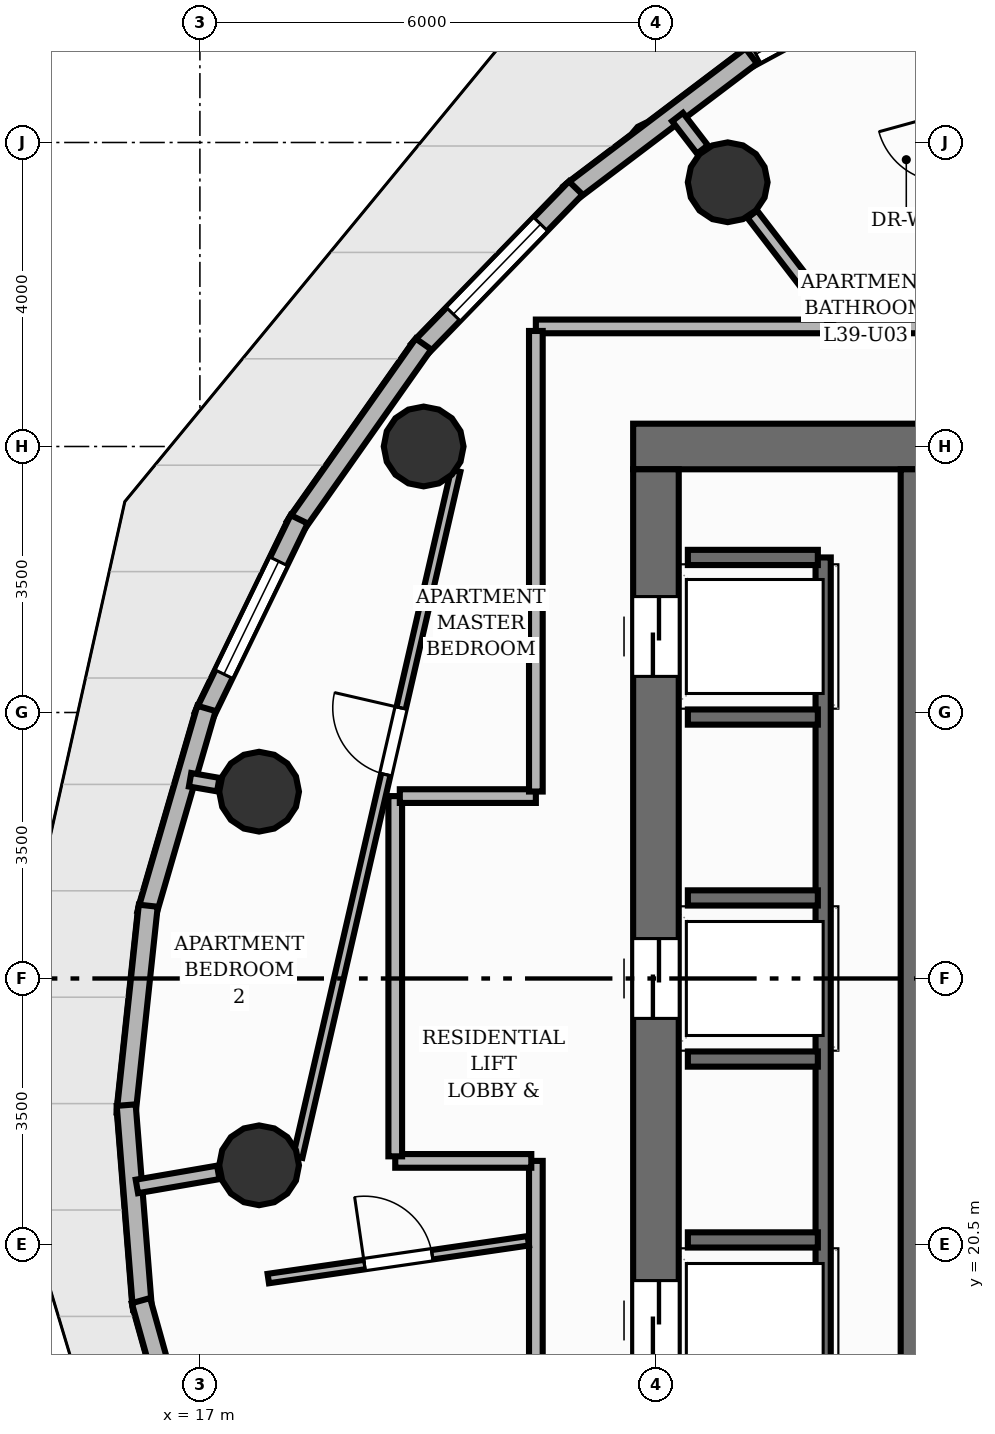
"""IFC4 building model, lengths in metres.
Left out: names, types, materials, properties, quantities, classifications, styles, units other than length and angle.
Written with IfcOpenShell. Run it as: python <this file> out.ifc"""

import sys

from ifc_helpers import new_model, si_unit, direction, frame, frame_2d, origin, origin_2d, place, context, subcontext, project, spatial, rectangle, circle, extrude, element, fill, save


model = new_model("IFC4")
c1 = context("Model", 3, precision=1e-05, world=origin(), true_north=direction((0.0, 1.0)))
c2 = subcontext(c1, "Body", "Model", "MODEL_VIEW")
j1 = project(units=[si_unit("LENGTHUNIT", "METRE"), si_unit("PLANEANGLEUNIT", "RADIAN")], contexts=[c1])
p1 = place(None, origin())
s1 = spatial("IfcSite", under=j1, at=p1, CompositionType="ELEMENT")
p2 = place(p1, origin())
s2 = spatial("IfcBuilding", under=s1, at=p2, CompositionType="ELEMENT")
p3 = place(p2, frame((0.0, 0.0, 132.96)))
s3 = spatial("IfcBuildingStorey", under=s2, at=p3, CompositionType="ELEMENT", Elevation=132.96)
p4 = place(p3, frame((22.7, 31.0, 0.0), z_axis=(0.0, 0.0, 1.0), x_axis=(1.0, 0.0, 0.0)))
e1 = element("IfcWall", 1, at=p4, inside=s3, PredefinedType="SHEAR", context=c2, shape_type="SweptSolid", body=[
    extrude(rectangle(XDim=15.1, YDim=0.6, at=frame_2d((7.55, 0.0))), origin(), (0.0, 0.0, 1.0), 3.2),
])
p5 = place(p4, frame((11.7, 0.0, 0.0)))
e2 = element("IfcOpeningElement", 2, at=p5, cuts=e1, PredefinedType="OPENING", context=c2, shape_type="SweptSolid", body=[
    extrude(rectangle(XDim=1.1, YDim=2.15, at=frame_2d((0.55, 1.075))), frame((0.0, 0.31, 0.0), z_axis=(0.0, -1.0, 0.0), x_axis=(1.0, 0.0, 0.0)), (0.0, 0.0, 1.0), 0.62),
])
p6 = place(p3, frame((23.0, 17.3, 0.0), z_axis=(0.0, 0.0, 1.0), x_axis=(0.0, 1.0, 0.0)))
e3 = element("IfcWall", 3, at=p6, inside=s3, PredefinedType="SHEAR", context=c2, shape_type="SweptSolid", body=[
    extrude(rectangle(XDim=13.4, YDim=0.6, at=frame_2d((6.7, 0.0))), origin(), (0.0, 0.0, 1.0), 3.2),
])
p7 = place(p6, frame((1.675, 0.0, 0.0)))
e4 = element("IfcOpeningElement", 4, at=p7, cuts=e3, PredefinedType="OPENING", context=c2, shape_type="SweptSolid", body=[
    extrude(rectangle(XDim=1.05, YDim=2.15, at=frame_2d((0.525, 1.075))), frame((0.0, 0.31, 0.0), z_axis=(0.0, -1.0, 0.0), x_axis=(1.0, 0.0, 0.0)), (0.0, 0.0, 1.0), 0.62),
])
p8 = place(p6, frame((6.175, 0.0, 0.0)))
e5 = element("IfcOpeningElement", 5, at=p8, cuts=e3, PredefinedType="OPENING", context=c2, shape_type="SweptSolid", body=[
    extrude(rectangle(XDim=1.05, YDim=2.15, at=frame_2d((0.525, 1.075))), frame((0.0, 0.31, 0.0), z_axis=(0.0, -1.0, 0.0), x_axis=(1.0, 0.0, 0.0)), (0.0, 0.0, 1.0), 0.62),
])
p9 = place(p6, frame((10.675, 0.0, 0.0)))
e6 = element("IfcOpeningElement", 6, at=p9, cuts=e3, PredefinedType="OPENING", context=c2, shape_type="SweptSolid", body=[
    extrude(rectangle(XDim=1.05, YDim=2.15, at=frame_2d((0.525, 1.075))), frame((0.0, 0.31, 0.0), z_axis=(0.0, -1.0, 0.0), x_axis=(1.0, 0.0, 0.0)), (0.0, 0.0, 1.0), 0.62),
])
p10 = place(p3, frame((26.5, 17.3, 0.0), z_axis=(0.0, 0.0, 1.0), x_axis=(0.0, 1.0, 0.0)))
e7 = element("IfcWall", 7, at=p10, inside=s3, PredefinedType="SHEAR", context=c2, shape_type="SweptSolid", body=[
    extrude(rectangle(XDim=13.4, YDim=0.56, at=frame_2d((6.7, 0.0))), origin(), (0.0, 0.0, 1.0), 3.2),
])
for number, where, z_axis, x_axis in (
    (8, (23.944, 34.477, 0.0), (0.0, 0.0, 1.0), (1.0, 0.0, 0.0)),
    (9, (19.944, 31.0, 0.0), (0.0, 0.0, 1.0), (1.0, 0.0, 0.0)),
    (10, (17.779, 26.458, 0.0), (0.0, 0.0, 1.0), (1.0, 0.0, 0.0)),
    (11, (17.779, 21.542, 0.0), (0.0, 0.0, 1.0), (1.0, 0.0, 0.0)),
):
    element("IfcColumn", number, at=place(p3, frame(where, z_axis=z_axis, x_axis=x_axis)), inside=s3, PredefinedType="COLUMN", context=c2, shape_type="SweptSolid", body=[
        extrude(circle(Radius=0.525, at=origin_2d()), origin(), (0.0, 0.0, 1.0), 3.2),
    ])
p11 = place(p3, frame((24.163, 36.079, 0.0), z_axis=(0.0, 0.0, 1.0), x_axis=(0.879567466611, 0.475774181393, 0.0)))
e12 = element("IfcWall", 12, at=p11, inside=s3, PredefinedType="SOLIDWALL", context=c2, shape_type="SweptSolid", body=[
    extrude(rectangle(XDim=2.998, YDim=0.25, at=frame_2d((1.499, 0.0))), origin(), (0.0, 0.0, 1.0), 2.96),
])
p12 = place(p11, frame((0.175, 0.0, 0.85)))
e13 = element("IfcOpeningElement", 13, at=p12, cuts=e12, PredefinedType="OPENING", context=c2, shape_type="SweptSolid", body=[
    extrude(rectangle(XDim=1.65, YDim=1.55, at=frame_2d((0.825, 0.775))), frame((0.0, 0.135, 0.0), z_axis=(0.0, -1.0, 0.0), x_axis=(1.0, 0.0, 0.0)), (0.0, 0.0, 1.0), 0.27),
])
p13 = place(p3, frame((21.863, 34.329, 0.0), z_axis=(0.0, 0.0, 1.0), x_axis=(0.797511213298, 0.603304122863, 0.0)))
e14 = element("IfcWall", 14, at=p13, inside=s3, PredefinedType="SOLIDWALL", context=c2, shape_type="SweptSolid", body=[
    extrude(rectangle(XDim=2.998, YDim=0.25, at=frame_2d((1.499, 0.0))), origin(), (0.0, 0.0, 1.0), 2.96),
])
p14 = place(p3, frame((19.872, 32.264, 0.0), z_axis=(0.0, 0.0, 1.0), x_axis=(0.696240605886, 0.717808483312, 0.0)))
e15 = element("IfcWall", 15, at=p14, inside=s3, PredefinedType="SOLIDWALL", context=c2, shape_type="SweptSolid", body=[
    extrude(rectangle(XDim=2.977, YDim=0.25, at=frame_2d((1.489, 0.0))), origin(), (0.0, 0.0, 1.0), 2.96),
])
p15 = place(p14, frame((0.664, 0.0, 0.85)))
e16 = element("IfcOpeningElement", 16, at=p15, cuts=e15, PredefinedType="OPENING", context=c2, shape_type="SweptSolid", body=[
    extrude(rectangle(XDim=1.65, YDim=1.55, at=frame_2d((0.825, 0.775))), frame((0.0, 0.135, 0.0), z_axis=(0.0, -1.0, 0.0), x_axis=(1.0, 0.0, 0.0)), (0.0, 0.0, 1.0), 0.27),
])
p16 = place(p3, frame((18.25, 29.948, 0.0), z_axis=(0.0, 0.0, 1.0), x_axis=(0.576020449187, 0.817435283137, 0.0)))
e17 = element("IfcWall", 17, at=p16, inside=s3, PredefinedType="SOLIDWALL", context=c2, shape_type="SweptSolid", body=[
    extrude(rectangle(XDim=2.937, YDim=0.25, at=frame_2d((1.468, 0.0))), origin(), (0.0, 0.0, 1.0), 2.96),
])
p17 = place(p3, frame((17.047, 27.45, 0.0), z_axis=(0.0, 0.0, 1.0), x_axis=(0.436882419805, 0.899518621967, 0.0)))
e18 = element("IfcWall", 18, at=p17, inside=s3, PredefinedType="SOLIDWALL", context=c2, shape_type="SweptSolid", body=[
    extrude(rectangle(XDim=2.882, YDim=0.25, at=frame_2d((1.441, 0.0))), origin(), (0.0, 0.0, 1.0), 2.96),
])
p18 = place(p17, frame((0.616, 0.0, 0.85)))
e19 = element("IfcOpeningElement", 19, at=p18, cuts=e18, PredefinedType="OPENING", context=c2, shape_type="SweptSolid", body=[
    extrude(rectangle(XDim=1.65, YDim=1.55, at=frame_2d((0.825, 0.775))), frame((0.0, 0.135, 0.0), z_axis=(0.0, -1.0, 0.0), x_axis=(1.0, 0.0, 0.0)), (0.0, 0.0, 1.0), 0.27),
])
p19 = place(p3, frame((16.299, 24.848, 0.0), z_axis=(0.0, 0.0, 1.0), x_axis=(0.27958078407, 0.960122172007, 0.0)))
e20 = element("IfcWall", 20, at=p19, inside=s3, PredefinedType="SOLIDWALL", context=c2, shape_type="SweptSolid", body=[
    extrude(rectangle(XDim=2.818, YDim=0.25, at=frame_2d((1.409, 0.0))), origin(), (0.0, 0.0, 1.0), 2.96),
])
p20 = place(p3, frame((16.029, 22.221, 0.0), z_axis=(0.0, 0.0, 1.0), x_axis=(0.106010014212, 0.994365062181, 0.0)))
e21 = element("IfcWall", 21, at=p20, inside=s3, PredefinedType="SOLIDWALL", context=c2, shape_type="SweptSolid", body=[
    extrude(rectangle(XDim=2.752, YDim=0.25, at=frame_2d((1.376, 0.0))), origin(), (0.0, 0.0, 1.0), 2.96),
])
p21 = place(p3, frame((16.244, 19.65, 0.0), z_axis=(0.0, 0.0, 1.0), x_axis=(-0.079420906371, 0.996841170714, 0.0)))
e22 = element("IfcWall", 22, at=p21, inside=s3, PredefinedType="SOLIDWALL", context=c2, shape_type="SweptSolid", body=[
    extrude(rectangle(XDim=2.693, YDim=0.25, at=frame_2d((1.346, 0.0))), origin(), (0.0, 0.0, 1.0), 2.96),
])
p22 = place(p3, frame((16.938, 17.211, 0.0), z_axis=(0.0, 0.0, 1.0), x_axis=(-0.269469206067, 0.963009006698, 0.0)))
e23 = element("IfcWall", 23, at=p22, inside=s3, PredefinedType="SOLIDWALL", context=c2, shape_type="SweptSolid", body=[
    extrude(rectangle(XDim=2.648, YDim=0.25, at=frame_2d((1.324, 0.0))), origin(), (0.0, 0.0, 1.0), 2.96),
])
p23 = place(p3, frame((25.2, 18.46, 0.0), z_axis=(0.0, 0.0, 1.0), x_axis=(0.0, 1.0, 0.0)))
e24 = element("IfcWall", 24, at=p23, inside=s3, PredefinedType="SHEAR", context=c2, shape_type="SweptSolid", body=[
    extrude(rectangle(XDim=11.08, YDim=0.2, at=frame_2d((5.54, 0.0))), origin(), (0.0, 0.0, 1.0), 3.2),
])
for number, where, z_axis, x_axis in (
    (25, (23.42, 29.54, 0.0), (0.0, 0.0, 1.0), (1.0, 0.0, 0.0)),
    (26, (23.42, 20.56, 0.0), (0.0, 0.0, 1.0), (1.0, 0.0, 0.0)),
    (27, (23.42, 22.94, 0.0), (0.0, 0.0, 1.0), (1.0, 0.0, 0.0)),
    (28, (23.42, 25.06, 0.0), (0.0, 0.0, 1.0), (1.0, 0.0, 0.0)),
    (29, (23.42, 27.44, 0.0), (0.0, 0.0, 1.0), (1.0, 0.0, 0.0)),
):
    element("IfcWall", number, at=place(p3, frame(where, z_axis=z_axis, x_axis=x_axis)), inside=s3, PredefinedType="SHEAR", context=c2, shape_type="SweptSolid", body=[
        extrude(rectangle(XDim=1.71, YDim=0.2, at=frame_2d((0.855, 0.0))), origin(), (0.0, 0.0, 1.0), 3.2),
    ])
p24 = place(p3, frame((23.612, 34.908, 0.0), z_axis=(0.0, 0.0, 1.0), x_axis=(-0.609469486836, 0.792809526063, 0.0)))
e30 = element("IfcWall", 30, at=p24, inside=s3, PredefinedType="PARTITIONING", context=c2, shape_type="SweptSolid", body=[
    extrude(rectangle(XDim=0.538, YDim=0.18, at=frame_2d((0.269, 0.0))), origin(), (0.0, 0.0, 1.0), 2.336),
])
p25 = place(p3, frame((17.242, 26.551, 0.0), z_axis=(0.0, 0.0, 1.0), x_axis=(-0.98535888436, 0.170493017491, 0.0)))
e31 = element("IfcWall", 31, at=p25, inside=s3, PredefinedType="PARTITIONING", context=c2, shape_type="SweptSolid", body=[
    extrude(rectangle(XDim=0.377, YDim=0.18, at=frame_2d((0.188, 0.0))), origin(), (0.0, 0.0, 1.0), 2.336),
])
p26 = place(p3, frame((17.242, 21.449, 0.0), z_axis=(0.0, 0.0, 1.0), x_axis=(-0.985361391556, -0.170478526599, 0.0)))
e32 = element("IfcWall", 32, at=p26, inside=s3, PredefinedType="PARTITIONING", context=c2, shape_type="SweptSolid", body=[
    extrude(rectangle(XDim=1.087, YDim=0.18, at=frame_2d((0.543, 0.0))), origin(), (0.0, 0.0, 1.0), 2.336),
])
p27 = place(p3, frame((21.42, 32.58, 0.0), z_axis=(0.0, 0.0, 1.0), x_axis=(1.0, 0.0, 0.0)))
e33 = element("IfcWall", 33, at=p27, inside=s3, PredefinedType="PARTITIONING", context=c2, shape_type="SweptSolid", body=[
    extrude(rectangle(XDim=11.105, YDim=0.18, at=frame_2d((5.552, 0.0))), origin(), (0.0, 0.0, 1.0), 2.955),
])
p28 = place(p27, frame((8.093, 0.0, 0.0)))
e34 = element("IfcOpeningElement", 34, at=p28, cuts=e33, PredefinedType="OPENING", context=c2, shape_type="SweptSolid", body=[
    extrude(rectangle(XDim=1.05, YDim=2.15, at=frame_2d((0.525, 1.075))), frame((0.0, 0.1, 0.0), z_axis=(0.0, -1.0, 0.0), x_axis=(1.0, 0.0, 0.0)), (0.0, 0.0, 1.0), 0.2),
])
p29 = place(p3, frame((21.42, 15.48, 0.0), z_axis=(0.0, 0.0, 1.0), x_axis=(0.0, 1.0, 0.0)))
e35 = element("IfcWall", 35, at=p29, inside=s3, PredefinedType="PARTITIONING", context=c2, shape_type="SweptSolid", body=[
    extrude(rectangle(XDim=6.12, YDim=0.18, at=frame_2d((3.06, 0.0))), origin(), (0.0, 0.0, 1.0), 2.955),
])
p30 = place(p29, frame((2.167, 0.0, 0.0)))
e36 = element("IfcOpeningElement", 36, at=p30, cuts=e35, PredefinedType="OPENING", context=c2, shape_type="SweptSolid", body=[
    extrude(rectangle(XDim=1.05, YDim=2.15, at=frame_2d((0.525, 1.075))), frame((0.0, 0.1, 0.0), z_axis=(0.0, -1.0, 0.0), x_axis=(1.0, 0.0, 0.0)), (0.0, 0.0, 1.0), 0.2),
])
p31 = place(p3, frame((21.36, 21.6, 0.0), z_axis=(0.0, 0.0, 1.0), x_axis=(-1.0, 0.0, 0.0)))
e37 = element("IfcWall", 37, at=p31, inside=s3, PredefinedType="PARTITIONING", context=c2, shape_type="SweptSolid", body=[
    extrude(rectangle(XDim=1.79, YDim=0.18, at=frame_2d((0.895, 0.0))), origin(), (0.0, 0.0, 1.0), 2.336),
])
p32 = place(p3, frame((19.57, 21.66, 0.0), z_axis=(0.0, 0.0, 1.0), x_axis=(0.0, 1.0, 0.0)))
e38 = element("IfcWall", 38, at=p32, inside=s3, PredefinedType="PARTITIONING", context=c2, shape_type="SweptSolid", body=[
    extrude(rectangle(XDim=4.74, YDim=0.18, at=frame_2d((2.37, 0.0))), origin(), (0.0, 0.0, 1.0), 2.955),
])
p33 = place(p3, frame((19.63, 26.4, 0.0), z_axis=(0.0, 0.0, 1.0), x_axis=(1.0, 0.0, 0.0)))
e39 = element("IfcWall", 39, at=p33, inside=s3, PredefinedType="PARTITIONING", context=c2, shape_type="SweptSolid", body=[
    extrude(rectangle(XDim=1.79, YDim=0.18, at=frame_2d((0.895, 0.0))), origin(), (0.0, 0.0, 1.0), 2.955),
])
p34 = place(p3, frame((21.42, 26.46, 0.0), z_axis=(0.0, 0.0, 1.0), x_axis=(0.0, 1.0, 0.0)))
e40 = element("IfcWall", 40, at=p34, inside=s3, PredefinedType="PARTITIONING", context=c2, shape_type="SweptSolid", body=[
    extrude(rectangle(XDim=6.06, YDim=0.18, at=frame_2d((3.03, 0.0))), origin(), (0.0, 0.0, 1.0), 2.955),
])
p35 = place(p3, frame((27.545, 32.677, 0.0), z_axis=(0.0, 0.0, 1.0), x_axis=(-0.265393905211, 0.964140070258, 0.0)))
e41 = element("IfcWall", 41, at=p35, inside=s3, PredefinedType="PLUMBINGWALL", context=c2, shape_type="SweptSolid", body=[
    extrude(rectangle(XDim=4.708, YDim=0.16, at=frame_2d((2.354, 0.0))), origin(), (0.0, 0.0, 1.0), 2.955),
])
p36 = place(p35, frame((1.904, 0.0, 0.0)))
e42 = element("IfcOpeningElement", 42, at=p36, cuts=e41, PredefinedType="OPENING", context=c2, shape_type="SweptSolid", body=[
    extrude(rectangle(XDim=0.9, YDim=2.1, at=frame_2d((0.45, 1.05))), frame((0.0, 0.09, 0.0), z_axis=(0.0, -1.0, 0.0), x_axis=(1.0, 0.0, 0.0)), (0.0, 0.0, 1.0), 0.18),
])
p37 = place(p3, frame((25.342, 32.659, 0.0), z_axis=(0.0, 0.0, 1.0), x_axis=(-0.609536601946, 0.792757927042, 0.0)))
e43 = element("IfcWall", 43, at=p37, inside=s3, PredefinedType="PLUMBINGWALL", context=c2, shape_type="SweptSolid", body=[
    extrude(rectangle(XDim=1.761, YDim=0.16, at=frame_2d((0.881, 0.0))), origin(), (0.0, 0.0, 1.0), 2.336),
])
p38 = place(p3, frame((17.899, 20.052, 0.0), z_axis=(0.0, 0.0, 1.0), x_axis=(0.989601977359, 0.143832980941, 0.0)))
e44 = element("IfcWall", 44, at=p38, inside=s3, PredefinedType="PARTITIONING", context=c2, shape_type="SweptSolid", body=[
    extrude(rectangle(XDim=3.458, YDim=0.125, at=frame_2d((1.729, 0.0))), origin(), (0.0, 0.0, 1.0), 2.692),
])
p39 = place(p38, frame((1.279, 0.0, 0.0)))
e45 = element("IfcOpeningElement", 45, at=p39, cuts=e44, PredefinedType="OPENING", context=c2, shape_type="SweptSolid", body=[
    extrude(rectangle(XDim=0.9, YDim=2.1, at=frame_2d((0.45, 1.05))), frame((0.0, 0.073, 0.0), z_axis=(0.0, -1.0, 0.0), x_axis=(1.0, 0.0, 0.0)), (0.0, 0.0, 1.0), 0.145),
])
p40 = place(p3, frame((18.287, 21.653, 0.0), z_axis=(0.0, 0.0, 1.0), x_axis=(0.2244032695, 0.974496368714, 0.0)))
e46 = element("IfcWall", 46, at=p40, inside=s3, PredefinedType="PARTITIONING", context=c2, shape_type="SweptSolid", body=[
    extrude(rectangle(XDim=9.263, YDim=0.125, at=frame_2d((4.631, 0.0))), origin(), (0.0, 0.0, 1.0), 2.955),
])
p41 = place(p40, frame((5.161, 0.0, 0.0)))
e47 = element("IfcOpeningElement", 47, at=p41, cuts=e46, PredefinedType="OPENING", context=c2, shape_type="SweptSolid", body=[
    extrude(rectangle(XDim=0.9, YDim=2.1, at=frame_2d((0.45, 1.05))), frame((0.0, 0.073, 0.0), z_axis=(0.0, -1.0, 0.0), x_axis=(1.0, 0.0, 0.0)), (0.0, 0.0, 1.0), 0.145),
])
p42 = place(p12, origin())
e48 = element("IfcWindow", 48, at=p42, inside=s3, PartitioningType="SINGLE_PANEL", PredefinedType="WINDOW", context=c2, shape_type="SweptSolid", body=[
    extrude(rectangle(XDim=1.65, YDim=1.55, at=frame_2d((0.825, 0.775))), frame((0.0, 0.03, 0.0), z_axis=(0.0, -1.0, 0.0), x_axis=(1.0, 0.0, 0.0)), (0.0, 0.0, 1.0), 0.06),
])
fill(e13, e48)
p43 = place(p15, origin())
e49 = element("IfcWindow", 49, at=p43, inside=s3, PartitioningType="SINGLE_PANEL", PredefinedType="WINDOW", context=c2, shape_type="SweptSolid", body=[
    extrude(rectangle(XDim=1.65, YDim=1.55, at=frame_2d((0.825, 0.775))), frame((0.0, 0.03, 0.0), z_axis=(0.0, -1.0, 0.0), x_axis=(1.0, 0.0, 0.0)), (0.0, 0.0, 1.0), 0.06),
])
fill(e16, e49)
p44 = place(p18, origin())
e50 = element("IfcWindow", 50, at=p44, inside=s3, PartitioningType="SINGLE_PANEL", PredefinedType="WINDOW", context=c2, shape_type="SweptSolid", body=[
    extrude(rectangle(XDim=1.65, YDim=1.55, at=frame_2d((0.825, 0.775))), frame((0.0, 0.03, 0.0), z_axis=(0.0, -1.0, 0.0), x_axis=(1.0, 0.0, 0.0)), (0.0, 0.0, 1.0), 0.06),
])
fill(e19, e50)
p45 = place(p7, origin())
e51 = element("IfcDoor", 51, at=p45, inside=s3, OperationType="DOUBLE_DOOR_SLIDING", PredefinedType="DOOR", context=c2, shape_type="SweptSolid", body=[
    extrude(rectangle(XDim=1.05, YDim=2.15, at=frame_2d((0.525, 1.075))), frame((0.0, 0.025, 0.0), z_axis=(0.0, -1.0, 0.0), x_axis=(1.0, 0.0, 0.0)), (0.0, 0.0, 1.0), 0.05),
])
fill(e4, e51)
p46 = place(p8, origin())
e52 = element("IfcDoor", 52, at=p46, inside=s3, OperationType="DOUBLE_DOOR_SLIDING", PredefinedType="DOOR", context=c2, shape_type="SweptSolid", body=[
    extrude(rectangle(XDim=1.05, YDim=2.15, at=frame_2d((0.525, 1.075))), frame((0.0, 0.025, 0.0), z_axis=(0.0, -1.0, 0.0), x_axis=(1.0, 0.0, 0.0)), (0.0, 0.0, 1.0), 0.05),
])
fill(e5, e52)
p47 = place(p9, origin())
e53 = element("IfcDoor", 53, at=p47, inside=s3, OperationType="DOUBLE_DOOR_SLIDING", PredefinedType="DOOR", context=c2, shape_type="SweptSolid", body=[
    extrude(rectangle(XDim=1.05, YDim=2.15, at=frame_2d((0.525, 1.075))), frame((0.0, 0.025, 0.0), z_axis=(0.0, -1.0, 0.0), x_axis=(1.0, 0.0, 0.0)), (0.0, 0.0, 1.0), 0.05),
])
fill(e6, e53)
p48 = place(p39, origin())
e54 = element("IfcDoor", 54, at=p48, inside=s3, OperationType="SINGLE_SWING_LEFT", PredefinedType="DOOR", context=c2, shape_type="SweptSolid", body=[
    extrude(rectangle(XDim=0.9, YDim=2.1, at=frame_2d((0.45, 1.05))), frame((0.0, 0.025, 0.0), z_axis=(0.0, -1.0, 0.0), x_axis=(1.0, 0.0, 0.0)), (0.0, 0.0, 1.0), 0.05),
])
fill(e45, e54)
p49 = place(p41, origin())
e55 = element("IfcDoor", 55, at=p49, inside=s3, OperationType="SINGLE_SWING_RIGHT", PredefinedType="DOOR", context=c2, shape_type="SweptSolid", body=[
    extrude(rectangle(XDim=0.9, YDim=2.1, at=frame_2d((0.45, 1.05))), frame((0.0, 0.025, 0.0), z_axis=(0.0, -1.0, 0.0), x_axis=(1.0, 0.0, 0.0)), (0.0, 0.0, 1.0), 0.05),
])
fill(e47, e55)
save(model, sys.argv[1])
